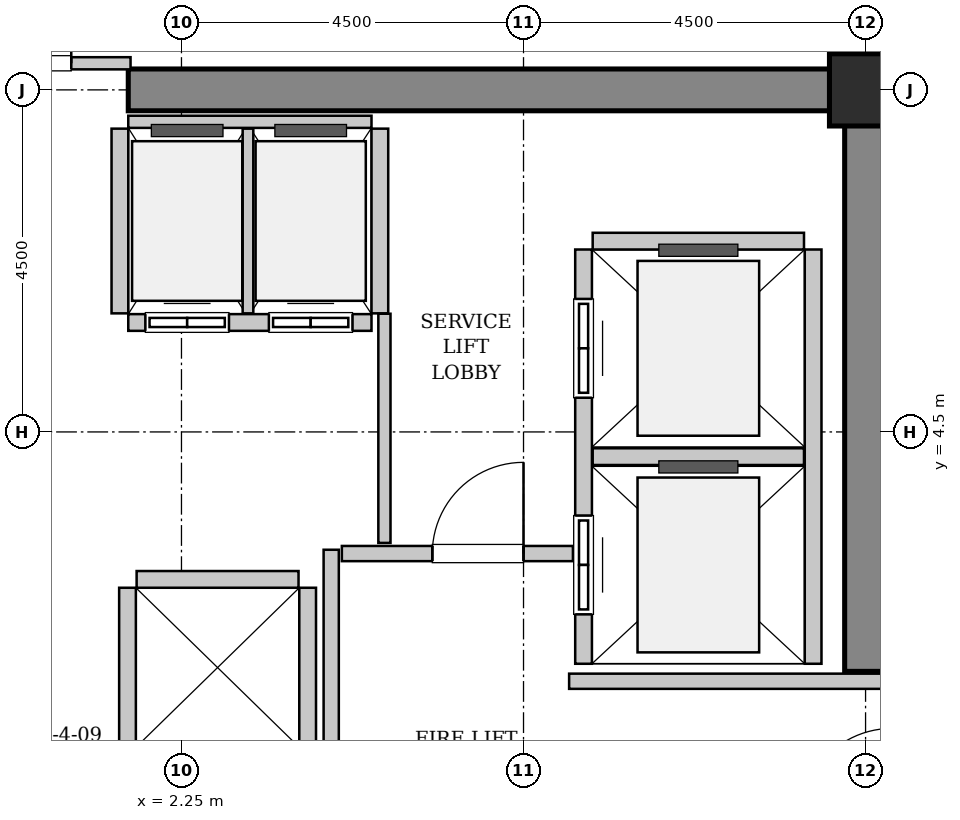
"""IFC4 building model, lengths in metres.
Left out: names, types, materials, properties, quantities, classifications, styles, units other than length and angle.
Written with IfcOpenShell. Run it as: python <this file> out.ifc"""

import sys

from ifc_helpers import new_model, si_unit, direction, frame, frame_2d, origin, origin_2d, place, context, subcontext, project, spatial, rectangle, hollow_rectangle, extrude, source, transform, mapped, element, fill, save


model = new_model("IFC4")
c1 = context("Model", 3, precision=1e-05, world=origin(), true_north=direction((0.0, 1.0)))
c2 = subcontext(c1, "Body", "Model", "MODEL_VIEW")
j1 = project(units=[si_unit("LENGTHUNIT", "METRE"), si_unit("PLANEANGLEUNIT", "RADIAN")], contexts=[c1])
p1 = place(None, origin())
s1 = spatial("IfcSite", under=j1, at=p1, CompositionType="ELEMENT")
p2 = place(p1, origin())
s2 = spatial("IfcBuilding", under=s1, at=p2, CompositionType="ELEMENT")
p3 = place(p2, frame((0.0, 0.0, 125.0)))
s3 = spatial("IfcBuildingStorey", under=s2, at=p3, CompositionType="ELEMENT", Elevation=125.0)
m1 = source(origin(), c2, "Body", "SweptSolid", [
    extrude(rectangle(XDim=9.975, YDim=0.55, at=frame_2d((4.987, 0.0))), origin(), (0.0, 0.0, 1.0), 3.8),
])
p4 = place(p3, frame((1.55, 9.0, 0.0), z_axis=(0.0, 0.0, 1.0), x_axis=(1.0, 0.0, 0.0)))
e1 = element("IfcWall", 1, at=p4, inside=s3, PredefinedType="SHEAR", context=c2, shape_type="MappedRepresentation", body=[
    mapped(m1, transform((0.0, 0.0, 0.0), x_axis=(1.0, 0.0, 0.0), y_axis=(0.0, 1.0, 0.0), z_axis=(0.0, 0.0, 1.0), scale=1.0)),
])
m2 = source(origin(), c2, "Body", "SweptSolid", [
    extrude(rectangle(XDim=7.375, YDim=0.55, at=frame_2d((3.688, 0.0))), origin(), (0.0, 0.0, 1.0), 3.8),
])
p5 = place(p3, frame((11.25, 1.35, 0.0), z_axis=(0.0, 0.0, 1.0), x_axis=(0.0, 1.0, 0.0)))
e2 = element("IfcWall", 2, at=p5, inside=s3, PredefinedType="SHEAR", context=c2, shape_type="MappedRepresentation", body=[
    mapped(m2, transform((0.0, 0.0, 0.0), x_axis=(1.0, 0.0, 0.0), y_axis=(0.0, 1.0, 0.0), z_axis=(0.0, 0.0, 1.0), scale=1.0)),
])
m3 = source(origin(), c2, "Body", "SweptSolid", [
    extrude(hollow_rectangle(XDim=0.95, YDim=0.95, WallThickness=0.045, InnerFilletRadius=0.045, OuterFilletRadius=0.09, at=origin_2d()), origin(), (0.0, 0.0, 1.0), 3.8),
])
p6 = place(p3, frame((11.25, 9.0, 0.0), z_axis=(0.0, 0.0, 1.0), x_axis=(1.0, 0.0, 0.0)))
e3 = element("IfcColumn", 3, at=p6, inside=s3, PredefinedType="COLUMN", context=c2, shape_type="MappedRepresentation", body=[
    mapped(m3, transform((0.0, 0.0, 0.0), x_axis=(1.0, 0.0, 0.0), y_axis=(0.0, 1.0, 0.0), z_axis=(0.0, 0.0, 1.0), scale=1.0)),
])
m4 = source(origin(), c2, "Body", "SweptSolid", [
    extrude(rectangle(XDim=5.45, YDim=0.22, at=frame_2d((2.725, 0.0))), origin(), (0.0, 0.0, 1.0), 3.535),
])
p7 = place(p3, frame((7.54, 6.9, 0.0), z_axis=(0.0, 0.0, 1.0), x_axis=(0.0, -1.0, 0.0)))
e4 = element("IfcWall", 4, at=p7, inside=s3, PredefinedType="SOLIDWALL", context=c2, shape_type="MappedRepresentation", body=[
    mapped(m4, transform((0.0, 0.0, 0.0), x_axis=(1.0, 0.0, 0.0), y_axis=(0.0, 1.0, 0.0), z_axis=(0.0, 0.0, 1.0), scale=1.0)),
])
p8 = place(p7, frame((3.5, 0.0, 0.0)))
e5 = element("IfcOpeningElement", 5, at=p8, cuts=e4, PredefinedType="OPENING", context=c2, shape_type="SweptSolid", body=[
    extrude(rectangle(XDim=1.3, YDim=2.3, at=frame_2d((0.65, 1.15))), frame((0.0, 0.12, 0.0), z_axis=(0.0, -1.0, 0.0), x_axis=(1.0, 0.0, 0.0)), (0.0, 0.0, 1.0), 0.24),
])
p9 = place(p7, frame((0.65, 0.0, 0.0)))
e6 = element("IfcOpeningElement", 6, at=p9, cuts=e4, PredefinedType="OPENING", context=c2, shape_type="SweptSolid", body=[
    extrude(rectangle(XDim=1.3, YDim=2.3, at=frame_2d((0.65, 1.15))), frame((0.0, 0.12, 0.0), z_axis=(0.0, -1.0, 0.0), x_axis=(1.0, 0.0, 0.0)), (0.0, 0.0, 1.0), 0.24),
])
p10 = place(p3, frame((10.56, 1.45, 0.0), z_axis=(0.0, 0.0, 1.0), x_axis=(0.0, 1.0, 0.0)))
e7 = element("IfcWall", 7, at=p10, inside=s3, PredefinedType="SOLIDWALL", context=c2, shape_type="MappedRepresentation", body=[
    mapped(m4, transform((0.0, 0.0, 0.0), x_axis=(1.0, 0.0, 0.0), y_axis=(0.0, 1.0, 0.0), z_axis=(0.0, 0.0, 1.0), scale=1.0)),
])
m5 = source(origin(), c2, "Body", "SweptSolid", [
    extrude(rectangle(XDim=2.78, YDim=0.22, at=frame_2d((1.39, 0.0))), origin(), (0.0, 0.0, 1.0), 3.535),
])
for number, where, z_axis, x_axis in (
    (8, (7.66, 4.175, 0.0), (0.0, 0.0, 1.0), (1.0, 0.0, 0.0)),
    (9, (10.44, 7.01, 0.0), (0.0, 0.0, 1.0), (-1.0, 0.0, 0.0)),
):
    element("IfcWall", number, at=place(p3, frame(where, z_axis=z_axis, x_axis=x_axis)), inside=s3, PredefinedType="SOLIDWALL", context=c2, shape_type="MappedRepresentation", body=[
        mapped(m5, transform((0.0, 0.0, 0.0), x_axis=(1.0, 0.0, 0.0), y_axis=(0.0, 1.0, 0.0), z_axis=(0.0, 0.0, 1.0), scale=1.0)),
    ])
m6 = source(origin(), c2, "Body", "SweptSolid", [
    extrude(rectangle(XDim=3.2, YDim=0.22, at=frame_2d((1.6, 0.0))), origin(), (0.0, 0.0, 1.0), 3.535),
])
p11 = place(p3, frame((1.55, 5.94, 0.0), z_axis=(0.0, 0.0, 1.0), x_axis=(1.0, 0.0, 0.0)))
e10 = element("IfcWall", 10, at=p11, inside=s3, PredefinedType="SOLIDWALL", context=c2, shape_type="MappedRepresentation", body=[
    mapped(m6, transform((0.0, 0.0, 0.0), x_axis=(1.0, 0.0, 0.0), y_axis=(0.0, 1.0, 0.0), z_axis=(0.0, 0.0, 1.0), scale=1.0)),
])
p12 = place(p11, frame((0.225, 0.0, 0.0)))
e11 = element("IfcOpeningElement", 11, at=p12, cuts=e10, PredefinedType="OPENING", context=c2, shape_type="SweptSolid", body=[
    extrude(rectangle(XDim=1.1, YDim=2.2, at=frame_2d((0.55, 1.1))), frame((0.0, 0.12, 0.0), z_axis=(0.0, -1.0, 0.0), x_axis=(1.0, 0.0, 0.0)), (0.0, 0.0, 1.0), 0.24),
])
p13 = place(p11, frame((1.85, 0.0, 0.0)))
e12 = element("IfcOpeningElement", 12, at=p13, cuts=e10, PredefinedType="OPENING", context=c2, shape_type="SweptSolid", body=[
    extrude(rectangle(XDim=1.1, YDim=2.2, at=frame_2d((0.55, 1.1))), frame((0.0, 0.12, 0.0), z_axis=(0.0, -1.0, 0.0), x_axis=(1.0, 0.0, 0.0)), (0.0, 0.0, 1.0), 0.24),
])
m7 = source(origin(), c2, "Body", "SweptSolid", [
    extrude(rectangle(XDim=3.2, YDim=0.16, at=frame_2d((1.6, 0.0))), origin(), (0.0, 0.0, 1.0), 2.425),
])
p14 = place(p3, frame((4.75, 8.58, 0.0), z_axis=(0.0, 0.0, 1.0), x_axis=(-1.0, 0.0, 0.0)))
e13 = element("IfcWall", 13, at=p14, inside=s3, PredefinedType="PARTITIONING", context=c2, shape_type="MappedRepresentation", body=[
    mapped(m7, transform((0.0, 0.0, 0.0), x_axis=(1.0, 0.0, 0.0), y_axis=(0.0, 1.0, 0.0), z_axis=(0.0, 0.0, 1.0), scale=1.0)),
])
m8 = source(origin(), c2, "Body", "SweptSolid", [
    extrude(rectangle(XDim=2.43, YDim=0.22, at=frame_2d((1.215, 0.0))), origin(), (0.0, 0.0, 1.0), 3.535),
])
p15 = place(p3, frame((1.44, 8.49, 0.0), z_axis=(0.0, 0.0, 1.0), x_axis=(0.0, -1.0, 0.0)))
e14 = element("IfcWall", 14, at=p15, inside=s3, PredefinedType="SOLIDWALL", context=c2, shape_type="MappedRepresentation", body=[
    mapped(m8, transform((0.0, 0.0, 0.0), x_axis=(1.0, 0.0, 0.0), y_axis=(0.0, 1.0, 0.0), z_axis=(0.0, 0.0, 1.0), scale=1.0)),
])
m9 = source(origin(), c2, "Body", "SweptSolid", [
    extrude(rectangle(XDim=2.43, YDim=0.14, at=frame_2d((1.215, 0.0))), origin(), (0.0, 0.0, 1.0), 3.535),
])
p16 = place(p3, frame((3.125, 6.06, 0.0), z_axis=(0.0, 0.0, 1.0), x_axis=(0.0, 1.0, 0.0)))
e15 = element("IfcWall", 15, at=p16, inside=s3, PredefinedType="PARTITIONING", context=c2, shape_type="MappedRepresentation", body=[
    mapped(m9, transform((0.0, 0.0, 0.0), x_axis=(1.0, 0.0, 0.0), y_axis=(0.0, 1.0, 0.0), z_axis=(0.0, 0.0, 1.0), scale=1.0)),
])
p17 = place(p3, frame((4.86, 6.06, 0.0), z_axis=(0.0, 0.0, 1.0), x_axis=(0.0, 1.0, 0.0)))
e16 = element("IfcWall", 16, at=p17, inside=s3, PredefinedType="SOLIDWALL", context=c2, shape_type="MappedRepresentation", body=[
    mapped(m8, transform((0.0, 0.0, 0.0), x_axis=(1.0, 0.0, 0.0), y_axis=(0.0, 1.0, 0.0), z_axis=(0.0, 0.0, 1.0), scale=1.0)),
])
m10 = source(origin(), c2, "Body", "SweptSolid", [
    extrude(rectangle(XDim=4.9, YDim=0.22, at=frame_2d((2.45, 0.0))), origin(), (0.0, 0.0, 1.0), 3.535),
])
for number, where, z_axis, x_axis in (
    (17, (1.54, 2.45, 0.0), (0.0, 0.0, 1.0), (0.0, -1.0, 0.0)),
    (18, (3.91, -2.45, 0.0), (0.0, 0.0, 1.0), (0.0, 1.0, 0.0)),
):
    element("IfcWall", number, at=place(p3, frame(where, z_axis=z_axis, x_axis=x_axis)), inside=s3, PredefinedType="SOLIDWALL", context=c2, shape_type="MappedRepresentation", body=[
        mapped(m10, transform((0.0, 0.0, 0.0), x_axis=(1.0, 0.0, 0.0), y_axis=(0.0, 1.0, 0.0), z_axis=(0.0, 0.0, 1.0), scale=1.0)),
    ])
m11 = source(origin(), c2, "Body", "SweptSolid", [
    extrude(rectangle(XDim=2.13, YDim=0.22, at=frame_2d((1.065, 0.0))), origin(), (0.0, 0.0, 1.0), 3.535),
])
p18 = place(p3, frame((3.79, 2.56, 0.0), z_axis=(0.0, 0.0, 1.0), x_axis=(-1.0, 0.0, 0.0)))
e19 = element("IfcWall", 19, at=p18, inside=s3, PredefinedType="SOLIDWALL", context=c2, shape_type="MappedRepresentation", body=[
    mapped(m11, transform((0.0, 0.0, 0.0), x_axis=(1.0, 0.0, 0.0), y_axis=(0.0, 1.0, 0.0), z_axis=(0.0, 0.0, 1.0), scale=1.0)),
])
m12 = source(origin(), c2, "Body", "SweptSolid", [
    extrude(rectangle(XDim=5.9, YDim=0.2, at=frame_2d((2.95, 0.0))), origin(), (0.0, 0.0, 1.0), 3.535),
])
p19 = place(p3, frame((4.22, -2.95, 0.0), z_axis=(0.0, 0.0, 1.0), x_axis=(0.0, 1.0, 0.0)))
e20 = element("IfcWall", 20, at=p19, inside=s3, PredefinedType="PARTITIONING", context=c2, shape_type="MappedRepresentation", body=[
    mapped(m12, transform((0.0, 0.0, 0.0), x_axis=(1.0, 0.0, 0.0), y_axis=(0.0, 1.0, 0.0), z_axis=(0.0, 0.0, 1.0), scale=1.0)),
])
m13 = source(origin(), c2, "Body", "SweptSolid", [
    extrude(rectangle(XDim=3.04, YDim=0.2, at=frame_2d((1.52, 0.0))), origin(), (0.0, 0.0, 1.0), 3.535),
])
p20 = place(p3, frame((4.36, 2.9, 0.0), z_axis=(0.0, 0.0, 1.0), x_axis=(1.0, 0.0, 0.0)))
e21 = element("IfcWall", 21, at=p20, inside=s3, PredefinedType="PARTITIONING", context=c2, shape_type="MappedRepresentation", body=[
    mapped(m13, transform((0.0, 0.0, 0.0), x_axis=(1.0, 0.0, 0.0), y_axis=(0.0, 1.0, 0.0), z_axis=(0.0, 0.0, 1.0), scale=1.0)),
])
p21 = place(p20, frame((1.19, 0.0, 0.0)))
e22 = element("IfcOpeningElement", 22, at=p21, cuts=e21, PredefinedType="OPENING", context=c2, shape_type="SweptSolid", body=[
    extrude(rectangle(XDim=1.2, YDim=2.15, at=frame_2d((0.6, 1.075))), frame((0.0, 0.11, 0.0), z_axis=(0.0, -1.0, 0.0), x_axis=(1.0, 0.0, 0.0)), (0.0, 0.0, 1.0), 0.22),
])
m14 = source(origin(), c2, "Body", "SweptSolid", [
    extrude(rectangle(XDim=4.11, YDim=0.2, at=frame_2d((2.055, 0.0))), origin(), (0.0, 0.0, 1.0), 3.535),
])
p22 = place(p3, frame((7.35, 1.22, 0.0), z_axis=(0.0, 0.0, 1.0), x_axis=(1.0, 0.0, 0.0)))
e23 = element("IfcWall", 23, at=p22, inside=s3, PredefinedType="PARTITIONING", context=c2, shape_type="MappedRepresentation", body=[
    mapped(m14, transform((0.0, 0.0, 0.0), x_axis=(1.0, 0.0, 0.0), y_axis=(0.0, 1.0, 0.0), z_axis=(0.0, 0.0, 1.0), scale=1.0)),
])
m15 = source(origin(), c2, "Body", "SweptSolid", [
    extrude(rectangle(XDim=3.16, YDim=0.16, at=frame_2d((1.58, 0.0))), origin(), (0.0, 0.0, 1.0), 2.425),
])
p23 = place(p3, frame((-1.58, 9.35, 0.0), z_axis=(0.0, 0.0, 1.0), x_axis=(1.0, 0.0, 0.0)))
e24 = element("IfcWall", 24, at=p23, inside=s3, PredefinedType="PARTITIONING", context=c2, shape_type="MappedRepresentation", body=[
    mapped(m15, transform((0.0, 0.0, 0.0), x_axis=(1.0, 0.0, 0.0), y_axis=(0.0, 1.0, 0.0), z_axis=(0.0, 0.0, 1.0), scale=1.0)),
])
p24 = place(p23, frame((0.78, 0.0, 0.0)))
e25 = element("IfcOpeningElement", 25, at=p24, cuts=e24, PredefinedType="OPENING", context=c2, shape_type="SweptSolid", body=[
    extrude(rectangle(XDim=1.6, YDim=2.3, at=frame_2d((0.8, 1.15))), frame((0.0, 0.09, 0.0), z_axis=(0.0, -1.0, 0.0), x_axis=(1.0, 0.0, 0.0)), (0.0, 0.0, 1.0), 0.18),
])
m16 = source(origin(), c2, "Body", "SweptSolid", [
    extrude(rectangle(XDim=3.015, YDim=0.16, at=frame_2d((1.507, 0.0))), origin(), (0.0, 0.0, 1.0), 3.535),
])
p25 = place(p3, frame((4.92, 3.04, 0.0), z_axis=(0.0, 0.0, 1.0), x_axis=(0.0, 1.0, 0.0)))
e26 = element("IfcWall", 26, at=p25, inside=s3, PredefinedType="PARTITIONING", context=c2, shape_type="MappedRepresentation", body=[
    mapped(m16, transform((0.0, 0.0, 0.0), x_axis=(1.0, 0.0, 0.0), y_axis=(0.0, 1.0, 0.0), z_axis=(0.0, 0.0, 1.0), scale=1.0)),
])
m17 = source(origin(), c2, "Body", "SweptSolid", [
    extrude(rectangle(XDim=1.3, YDim=2.3, at=frame_2d((0.65, 1.15))), frame((0.0, 0.025, 0.0), z_axis=(0.0, -1.0, 0.0), x_axis=(1.0, 0.0, 0.0)), (0.0, 0.0, 1.0), 0.05),
])
p26 = place(p8, origin())
e27 = element("IfcDoor", 27, at=p26, inside=s3, OperationType="SLIDING_TO_RIGHT", PredefinedType="DOOR", context=c2, shape_type="MappedRepresentation", body=[
    mapped(m17, transform((0.0, 0.0, 0.0), x_axis=(1.0, 0.0, 0.0), y_axis=(0.0, 1.0, 0.0), z_axis=(0.0, 0.0, 1.0), scale=1.0)),
])
fill(e5, e27)
p27 = place(p9, origin())
e28 = element("IfcDoor", 28, at=p27, inside=s3, OperationType="SLIDING_TO_RIGHT", PredefinedType="DOOR", context=c2, shape_type="MappedRepresentation", body=[
    mapped(m17, transform((0.0, 0.0, 0.0), x_axis=(1.0, 0.0, 0.0), y_axis=(0.0, 1.0, 0.0), z_axis=(0.0, 0.0, 1.0), scale=1.0)),
])
fill(e6, e28)
m18 = source(origin(), c2, "Body", "SweptSolid", [
    extrude(rectangle(XDim=1.1, YDim=2.2, at=frame_2d((0.55, 1.1))), frame((0.0, 0.025, 0.0), z_axis=(0.0, -1.0, 0.0), x_axis=(1.0, 0.0, 0.0)), (0.0, 0.0, 1.0), 0.05),
])
p28 = place(p12, origin())
e29 = element("IfcDoor", 29, at=p28, inside=s3, OperationType="DOUBLE_DOOR_SLIDING", PredefinedType="DOOR", context=c2, shape_type="MappedRepresentation", body=[
    mapped(m18, transform((0.0, 0.0, 0.0), x_axis=(1.0, 0.0, 0.0), y_axis=(0.0, 1.0, 0.0), z_axis=(0.0, 0.0, 1.0), scale=1.0)),
])
fill(e11, e29)
p29 = place(p13, origin())
e30 = element("IfcDoor", 30, at=p29, inside=s3, OperationType="DOUBLE_DOOR_SLIDING", PredefinedType="DOOR", context=c2, shape_type="MappedRepresentation", body=[
    mapped(m18, transform((0.0, 0.0, 0.0), x_axis=(1.0, 0.0, 0.0), y_axis=(0.0, 1.0, 0.0), z_axis=(0.0, 0.0, 1.0), scale=1.0)),
])
fill(e12, e30)
m19 = source(origin(), c2, "Body", "SweptSolid", [
    extrude(rectangle(XDim=1.2, YDim=2.15, at=frame_2d((0.6, 1.075))), frame((0.0, 0.025, 0.0), z_axis=(0.0, -1.0, 0.0), x_axis=(1.0, 0.0, 0.0)), (0.0, 0.0, 1.0), 0.05),
])
p30 = place(p21, origin())
e31 = element("IfcDoor", 31, at=p30, inside=s3, OperationType="SINGLE_SWING_RIGHT", PredefinedType="DOOR", context=c2, shape_type="MappedRepresentation", body=[
    mapped(m19, transform((0.0, 0.0, 0.0), x_axis=(1.0, 0.0, 0.0), y_axis=(0.0, 1.0, 0.0), z_axis=(0.0, 0.0, 1.0), scale=1.0)),
])
fill(e22, e31)
m20 = source(origin(), c2, "Body", "SweptSolid", [
    extrude(rectangle(XDim=1.6, YDim=2.3, at=frame_2d((0.8, 1.15))), frame((0.0, 0.025, 0.0), z_axis=(0.0, -1.0, 0.0), x_axis=(1.0, 0.0, 0.0)), (0.0, 0.0, 1.0), 0.05),
])
p31 = place(p24, origin())
e32 = element("IfcDoor", 32, at=p31, inside=s3, OperationType="DOUBLE_DOOR_SINGLE_SWING", PredefinedType="DOOR", context=c2, shape_type="MappedRepresentation", body=[
    mapped(m20, transform((0.0, 0.0, 0.0), x_axis=(1.0, 0.0, 0.0), y_axis=(0.0, 1.0, 0.0), z_axis=(0.0, 0.0, 1.0), scale=1.0)),
])
fill(e25, e32)
save(model, sys.argv[1])
